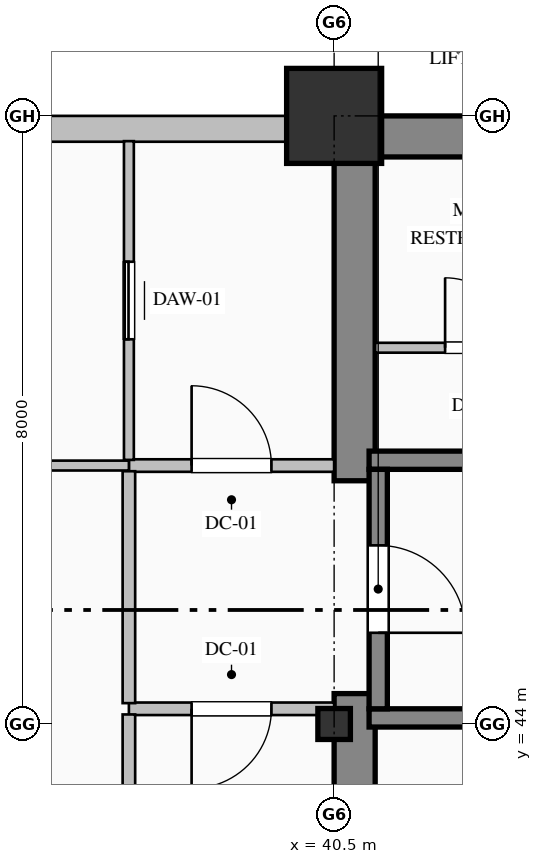
"""IFC4 building model, lengths in metres.
Left out: names, types, materials, properties, quantities, classifications, styles, units other than length and angle.
Written with IfcOpenShell. Run it as: python <this file> out.ifc"""

import sys

from ifc_helpers import new_model, si_unit, direction, frame, frame_2d, origin, origin_2d, place, context, subcontext, project, spatial, rectangle, hollow_rectangle, i_section, extrude, element, fill, save


model = new_model("IFC4")
c1 = context("Model", 3, precision=1e-05, world=origin(), true_north=direction((0.0, 1.0)))
c2 = subcontext(c1, "Body", "Model", "MODEL_VIEW")
j1 = project(units=[si_unit("LENGTHUNIT", "METRE"), si_unit("PLANEANGLEUNIT", "RADIAN")], contexts=[c1])
p1 = place(None, origin())
s1 = spatial("IfcSite", under=j1, at=p1, CompositionType="ELEMENT")
p2 = place(p1, origin())
s2 = spatial("IfcBuilding", under=s1, at=p2, CompositionType="ELEMENT")
p3 = place(p2, frame((0.0, 0.0, 56.2)))
s3 = spatial("IfcBuildingStorey", under=s2, at=p3, CompositionType="ELEMENT", Elevation=56.2)
p4 = place(p3, frame((40.5, 51.73, 0.0), z_axis=(0.0, 0.0, 1.0), x_axis=(1.0, 0.0, 0.0)))
e1 = element("IfcWall", 1, at=p4, inside=s3, PredefinedType="SHEAR", context=c2, shape_type="SweptSolid", body=[
    extrude(rectangle(XDim=23.5, YDim=0.54, at=frame_2d((11.75, 0.0))), origin(), (0.0, 0.0, 1.0), 3.75),
])
p5 = place(p3, frame((40.77, 36.54, 0.0), z_axis=(0.0, 0.0, 1.0), x_axis=(0.0, 1.0, 0.0)))
e2 = element("IfcWall", 2, at=p5, inside=s3, PredefinedType="SHEAR", context=c2, shape_type="SweptSolid", body=[
    extrude(rectangle(XDim=7.86, YDim=0.54, at=frame_2d((3.93, 0.0))), origin(), (0.0, 0.0, 1.0), 3.75),
])
p6 = place(p3, frame((40.77, 47.2, 0.0), z_axis=(0.0, 0.0, 1.0), x_axis=(0.0, 1.0, 0.0)))
e3 = element("IfcWall", 3, at=p6, inside=s3, PredefinedType="SHEAR", context=c2, shape_type="SweptSolid", body=[
    extrude(rectangle(XDim=4.26, YDim=0.54, at=frame_2d((2.13, 0.0))), origin(), (0.0, 0.0, 1.0), 3.75),
])
p7 = place(p3, frame((40.5, 44.0, 0.0), z_axis=(0.0, 0.0, 1.0), x_axis=(1.0, 0.0, 0.0)))
e4 = element("IfcColumn", 4, at=p7, inside=s3, PredefinedType="COLUMN", context=c2, shape_type="SweptSolid", body=[
    extrude(i_section(OverallWidth=0.407, OverallDepth=0.428, WebThickness=0.02, FlangeThickness=0.035, FilletRadius=0.022, at=origin_2d()), origin(), (0.0, 0.0, 1.0), 4.0),
])
p8 = place(p3, frame((40.5, 52.0, 0.0), z_axis=(0.0, 0.0, 1.0), x_axis=(1.0, 0.0, 0.0)))
e5 = element("IfcColumn", 5, at=p8, inside=s3, PredefinedType="COLUMN", context=c2, shape_type="SweptSolid", body=[
    extrude(hollow_rectangle(XDim=1.25, YDim=1.25, WallThickness=0.045, at=origin_2d()), origin(), (0.0, 0.0, 1.0), 4.0),
])
p9 = place(p3, frame((4.0, 51.83, 0.0), z_axis=(0.0, 0.0, 1.0), x_axis=(1.0, 0.0, 0.0)))
e6 = element("IfcWall", 6, at=p9, inside=s3, PredefinedType="SOLIDWALL", context=c2, shape_type="SweptSolid", body=[
    extrude(rectangle(XDim=36.52, YDim=0.34, at=frame_2d((18.26, 0.0))), origin(), (0.0, 0.0, 1.0), 3.25),
])
p10 = place(p9, frame((6.15, 0.0, 0.85)))
e7 = element("IfcOpeningElement", 7, at=p10, cuts=e6, PredefinedType="OPENING", context=c2, shape_type="SweptSolid", body=[
    extrude(rectangle(XDim=2.1, YDim=2.05, at=frame_2d((1.05, 1.025))), frame((0.0, 0.18, 0.0), z_axis=(0.0, -1.0, 0.0), x_axis=(1.0, 0.0, 0.0)), (0.0, 0.0, 1.0), 0.36),
])
p11 = place(p9, frame((13.5, 0.0, 0.85)))
e8 = element("IfcOpeningElement", 8, at=p11, cuts=e6, PredefinedType="OPENING", context=c2, shape_type="SweptSolid", body=[
    extrude(rectangle(XDim=1.8, YDim=2.05, at=frame_2d((0.9, 1.025))), frame((0.0, 0.18, 0.0), z_axis=(0.0, -1.0, 0.0), x_axis=(1.0, 0.0, 0.0)), (0.0, 0.0, 1.0), 0.36),
])
p12 = place(p9, frame((16.95, 0.0, 0.85)))
e9 = element("IfcOpeningElement", 9, at=p12, cuts=e6, PredefinedType="OPENING", context=c2, shape_type="SweptSolid", body=[
    extrude(rectangle(XDim=2.1, YDim=2.05, at=frame_2d((1.05, 1.025))), frame((0.0, 0.18, 0.0), z_axis=(0.0, -1.0, 0.0), x_axis=(1.0, 0.0, 0.0)), (0.0, 0.0, 1.0), 0.36),
])
p13 = place(p9, frame((24.3, 0.0, 0.85)))
e10 = element("IfcOpeningElement", 10, at=p13, cuts=e6, PredefinedType="OPENING", context=c2, shape_type="SweptSolid", body=[
    extrude(rectangle(XDim=1.8, YDim=2.05, at=frame_2d((0.9, 1.025))), frame((0.0, 0.18, 0.0), z_axis=(0.0, -1.0, 0.0), x_axis=(1.0, 0.0, 0.0)), (0.0, 0.0, 1.0), 0.36),
])
for number, where, z_axis, x_axis in (
    (11, (40.96, 47.47, 0.0), (0.0, 0.0, 1.0), (1.0, 0.0, 0.0)),
    (12, (49.04, 44.08, 0.0), (0.0, 0.0, 1.0), (-1.0, 0.0, 0.0)),
):
    element("IfcWall", number, at=place(p3, frame(where, z_axis=z_axis, x_axis=x_axis)), inside=s3, PredefinedType="SOLIDWALL", context=c2, shape_type="SweptSolid", body=[
        extrude(rectangle(XDim=8.08, YDim=0.24, at=frame_2d((4.04, 0.0))), origin(), (0.0, 0.0, 1.0), 4.0),
    ])
p14 = place(p3, frame((41.08, 47.35, 0.0), z_axis=(0.0, 0.0, 1.0), x_axis=(0.0, -1.0, 0.0)))
e13 = element("IfcWall", 13, at=p14, inside=s3, PredefinedType="SOLIDWALL", context=c2, shape_type="SweptSolid", body=[
    extrude(rectangle(XDim=3.15, YDim=0.24, at=frame_2d((1.575, 0.0))), origin(), (0.0, 0.0, 1.0), 4.0),
])
p15 = place(p14, frame((1.0, 0.0, 0.0)))
e14 = element("IfcOpeningElement", 14, at=p15, cuts=e13, PredefinedType="OPENING", context=c2, shape_type="SweptSolid", body=[
    extrude(rectangle(XDim=1.15, YDim=2.2, at=frame_2d((0.575, 1.1))), frame((0.0, 0.13, 0.0), z_axis=(0.0, -1.0, 0.0), x_axis=(1.0, 0.0, 0.0)), (0.0, 0.0, 1.0), 0.26),
])
p16 = place(p3, frame((37.8, 47.4, 0.0), z_axis=(0.0, 0.0, 1.0), x_axis=(1.0, 0.0, 0.0)))
e15 = element("IfcWall", 15, at=p16, inside=s3, PredefinedType="PARTITIONING", context=c2, shape_type="SweptSolid", body=[
    extrude(rectangle(XDim=2.7, YDim=0.165, at=frame_2d((1.35, 0.0))), origin(), (0.0, 0.0, 1.0), 3.75),
])
p17 = place(p16, frame((0.825, 0.0, 0.0)))
e16 = element("IfcOpeningElement", 16, at=p17, cuts=e15, PredefinedType="OPENING", context=c2, shape_type="SweptSolid", body=[
    extrude(rectangle(XDim=1.05, YDim=2.15, at=frame_2d((0.525, 1.075))), frame((0.0, 0.093, 0.0), z_axis=(0.0, -1.0, 0.0), x_axis=(1.0, 0.0, 0.0)), (0.0, 0.0, 1.0), 0.185),
])
p18 = place(p3, frame((40.5, 44.2, 0.0), z_axis=(0.0, 0.0, 1.0), x_axis=(-1.0, 0.0, 0.0)))
e17 = element("IfcWall", 17, at=p18, inside=s3, PredefinedType="PARTITIONING", context=c2, shape_type="SweptSolid", body=[
    extrude(rectangle(XDim=2.7, YDim=0.165, at=frame_2d((1.35, 0.0))), origin(), (0.0, 0.0, 1.0), 3.75),
])
p19 = place(p18, frame((0.825, 0.0, 0.0)))
e18 = element("IfcOpeningElement", 18, at=p19, cuts=e17, PredefinedType="OPENING", context=c2, shape_type="SweptSolid", body=[
    extrude(rectangle(XDim=1.05, YDim=2.15, at=frame_2d((0.525, 1.075))), frame((0.0, 0.093, 0.0), z_axis=(0.0, -1.0, 0.0), x_axis=(1.0, 0.0, 0.0)), (0.0, 0.0, 1.0), 0.185),
])
p20 = place(p3, frame((37.8, 44.274, 0.0), z_axis=(0.0, 0.0, 1.0), x_axis=(0.0, 1.0, 0.0)))
e19 = element("IfcWall", 19, at=p20, inside=s3, PredefinedType="PARTITIONING", context=c2, shape_type="SweptSolid", body=[
    extrude(rectangle(XDim=3.051, YDim=0.165, at=frame_2d((1.525, 0.0))), origin(), (0.0, 0.0, 1.0), 3.75),
])
p21 = place(p3, frame((37.8, 47.475, 0.0), z_axis=(0.0, 0.0, 1.0), x_axis=(0.0, 1.0, 0.0)))
e20 = element("IfcWall", 20, at=p21, inside=s3, PredefinedType="PARTITIONING", context=c2, shape_type="SweptSolid", body=[
    extrude(rectangle(XDim=4.193, YDim=0.13, at=frame_2d((2.097, 0.0))), origin(), (0.0, 0.0, 1.0), 3.75),
])
p22 = place(p21, frame((1.587, 0.0, 0.0)))
e21 = element("IfcOpeningElement", 21, at=p22, cuts=e20, PredefinedType="OPENING", context=c2, shape_type="SweptSolid", body=[
    extrude(rectangle(XDim=1.02, YDim=2.15, at=frame_2d((0.51, 1.075))), frame((0.0, 0.075, 0.0), z_axis=(0.0, -1.0, 0.0), x_axis=(1.0, 0.0, 0.0)), (0.0, 0.0, 1.0), 0.15),
])
p23 = place(p3, frame((37.8, 47.4, 0.0), z_axis=(0.0, 0.0, 1.0), x_axis=(-1.0, 0.0, 0.0)))
e22 = element("IfcWall", 22, at=p23, inside=s3, PredefinedType="PARTITIONING", context=c2, shape_type="SweptSolid", body=[
    extrude(rectangle(XDim=2.4, YDim=0.13, at=frame_2d((1.2, 0.0))), origin(), (0.0, 0.0, 1.0), 3.75),
])
p24 = place(p3, frame((41.04, 48.95, 0.0), z_axis=(0.0, 0.0, 1.0), x_axis=(1.0, 0.0, 0.0)))
e23 = element("IfcWall", 23, at=p24, inside=s3, PredefinedType="PARTITIONING", context=c2, shape_type="SweptSolid", body=[
    extrude(rectangle(XDim=2.76, YDim=0.13, at=frame_2d((1.38, 0.0))), origin(), (0.0, 0.0, 1.0), 3.75),
])
p25 = place(p24, frame((0.92, 0.0, 0.0)))
e24 = element("IfcOpeningElement", 24, at=p25, cuts=e23, PredefinedType="OPENING", context=c2, shape_type="SweptSolid", body=[
    extrude(rectangle(XDim=0.92, YDim=2.15, at=frame_2d((0.46, 1.075))), frame((0.0, 0.075, 0.0), z_axis=(0.0, -1.0, 0.0), x_axis=(1.0, 0.0, 0.0)), (0.0, 0.0, 1.0), 0.15),
])
p26 = place(p3, frame((37.8, 40.475, 0.0), z_axis=(0.0, 0.0, 1.0), x_axis=(0.0, 1.0, 0.0)))
e25 = element("IfcWall", 25, at=p26, inside=s3, PredefinedType="PARTITIONING", context=c2, shape_type="SweptSolid", body=[
    extrude(rectangle(XDim=3.651, YDim=0.165, at=frame_2d((1.825, 0.0))), origin(), (0.0, 0.0, 1.0), 3.75),
])
p27 = place(p15, origin())
e26 = element("IfcDoor", 26, at=p27, inside=s3, OperationType="SINGLE_SWING_RIGHT", PredefinedType="DOOR", context=c2, shape_type="SweptSolid", body=[
    extrude(rectangle(XDim=1.15, YDim=2.2, at=frame_2d((0.575, 1.1))), frame((0.0, 0.025, 0.0), z_axis=(0.0, -1.0, 0.0), x_axis=(1.0, 0.0, 0.0)), (0.0, 0.0, 1.0), 0.05),
])
fill(e14, e26)
p28 = place(p17, origin())
e27 = element("IfcDoor", 27, at=p28, inside=s3, OperationType="SINGLE_SWING_LEFT", PredefinedType="DOOR", context=c2, shape_type="SweptSolid", body=[
    extrude(rectangle(XDim=1.05, YDim=2.15, at=frame_2d((0.525, 1.075))), frame((0.0, 0.025, 0.0), z_axis=(0.0, -1.0, 0.0), x_axis=(1.0, 0.0, 0.0)), (0.0, 0.0, 1.0), 0.05),
])
fill(e16, e27)
p29 = place(p19, origin())
e28 = element("IfcDoor", 28, at=p29, inside=s3, OperationType="SINGLE_SWING_RIGHT", PredefinedType="DOOR", context=c2, shape_type="SweptSolid", body=[
    extrude(rectangle(XDim=1.05, YDim=2.15, at=frame_2d((0.525, 1.075))), frame((0.0, 0.025, 0.0), z_axis=(0.0, -1.0, 0.0), x_axis=(1.0, 0.0, 0.0)), (0.0, 0.0, 1.0), 0.05),
])
fill(e18, e28)
p30 = place(p22, origin())
e29 = element("IfcDoor", 29, at=p30, inside=s3, OperationType="SLIDING_TO_LEFT", PredefinedType="DOOR", context=c2, shape_type="SweptSolid", body=[
    extrude(rectangle(XDim=1.02, YDim=2.15, at=frame_2d((0.51, 1.075))), frame((0.0, 0.025, 0.0), z_axis=(0.0, -1.0, 0.0), x_axis=(1.0, 0.0, 0.0)), (0.0, 0.0, 1.0), 0.05),
])
fill(e21, e29)
p31 = place(p25, origin())
e30 = element("IfcDoor", 30, at=p31, inside=s3, OperationType="SINGLE_SWING_LEFT", PredefinedType="DOOR", context=c2, shape_type="SweptSolid", body=[
    extrude(rectangle(XDim=0.92, YDim=2.15, at=frame_2d((0.46, 1.075))), frame((0.0, 0.025, 0.0), z_axis=(0.0, -1.0, 0.0), x_axis=(1.0, 0.0, 0.0)), (0.0, 0.0, 1.0), 0.05),
])
fill(e24, e30)
save(model, sys.argv[1])
